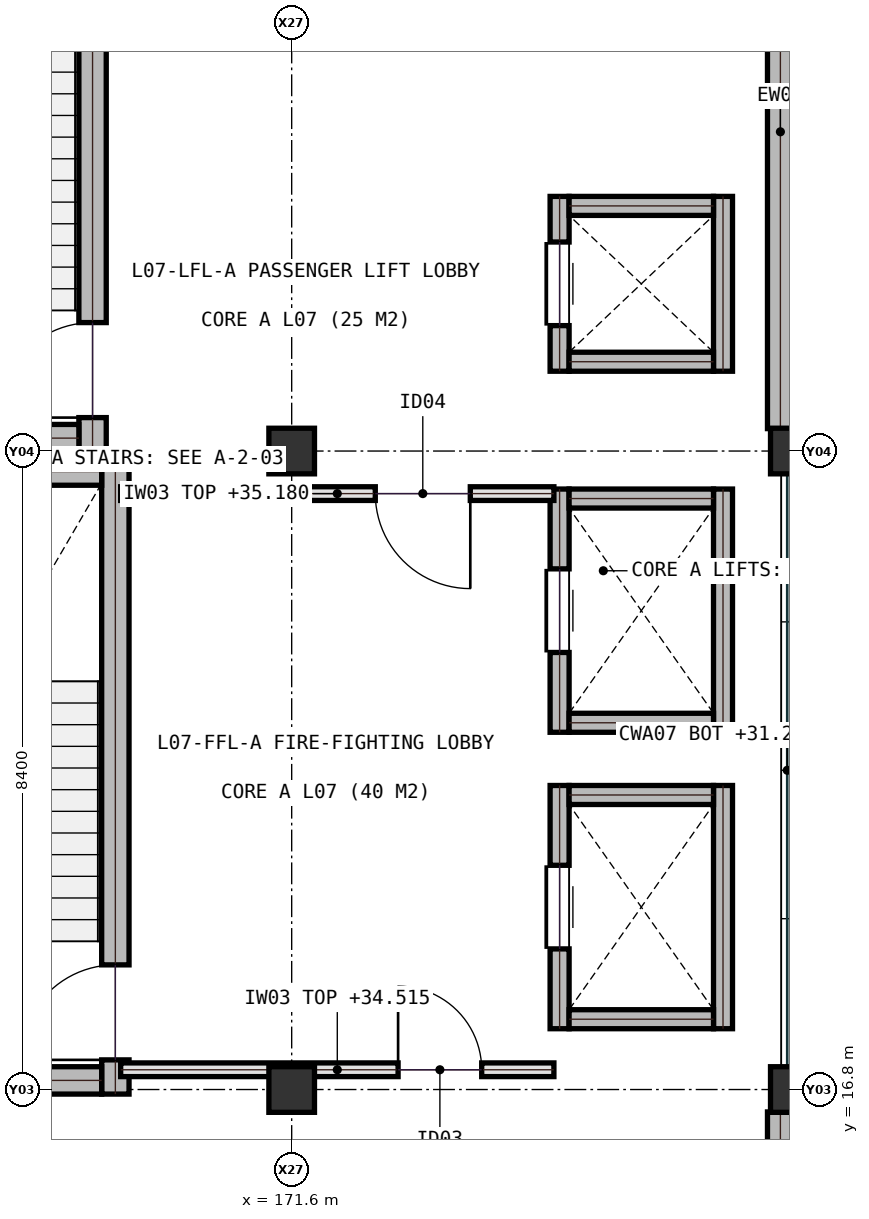
"""IFC4 building model, lengths in metres.
Left out: names, types, materials, properties, quantities, classifications, styles, units other than length and angle.
Written with IfcOpenShell. Run it as: python <this file> out.ifc"""

import sys

from ifc_helpers import new_model, si_unit, direction, frame, frame_2d, origin, origin_2d, place, context, subcontext, project, spatial, rectangle, extrude, element, fill, save


model = new_model("IFC4")
c1 = context("Model", 3, precision=1e-05, world=origin(), true_north=direction((0.0, 1.0)))
c2 = subcontext(c1, "Body", "Model", "MODEL_VIEW")
j1 = project(units=[si_unit("LENGTHUNIT", "METRE"), si_unit("PLANEANGLEUNIT", "RADIAN")], contexts=[c1])
p1 = place(None, origin())
s1 = spatial("IfcSite", under=j1, at=p1, CompositionType="ELEMENT")
p2 = place(p1, origin())
s2 = spatial("IfcBuilding", under=s1, at=p2, CompositionType="ELEMENT")
p3 = place(p2, frame((0.0, 0.0, 31.2)))
s3 = spatial("IfcBuildingStorey", under=s2, at=p3, CompositionType="ELEMENT", Elevation=31.2)
for number, where, z_axis, x_axis in (
    (1, (171.6, 16.8, 0.0), (0.0, 0.0, 1.0), (1.0, 0.0, 0.0)),
    (2, (171.6, 25.2, 0.0), (0.0, 0.0, 1.0), (1.0, 0.0, 0.0)),
    (3, (178.2, 16.8, 0.0), (0.0, 0.0, 1.0), (1.0, 0.0, 0.0)),
    (4, (178.2, 25.2, 0.0), (0.0, 0.0, 1.0), (1.0, 0.0, 0.0)),
):
    element("IfcColumn", number, at=place(p3, frame(where, z_axis=z_axis, x_axis=x_axis)), inside=s3, PredefinedType="COLUMN", context=c2, shape_type="SweptSolid", body=[
        extrude(rectangle(XDim=0.6, YDim=0.6, at=origin_2d()), origin(), (0.0, 0.0, 1.0), 4.2),
    ])
for number, where, z_axis, x_axis in (
    (5, (178.03, 8.695, 0.0), (0.0, 0.0, 1.0), (0.0, 1.0, 0.0)),
    (6, (178.03, 25.495, 0.0), (0.0, 0.0, 1.0), (0.0, 1.0, 0.0)),
):
    element("IfcWall", number, at=place(p3, frame(where, z_axis=z_axis, x_axis=x_axis)), inside=s3, PredefinedType="SHEAR", context=c2, shape_type="SweptSolid", body=[
        extrude(rectangle(XDim=7.81, YDim=0.34, at=frame_2d((3.905, 0.0))), origin(), (0.0, 0.0, 1.0), 3.98),
    ])
p4 = place(p3, frame((169.28, 16.74, 0.0), z_axis=(0.0, 0.0, 1.0), x_axis=(0.0, 1.0, 0.0)))
e7 = element("IfcWall", 7, at=p4, inside=s3, PredefinedType="SHEAR", context=c2, shape_type="SweptSolid", body=[
    extrude(rectangle(XDim=8.37, YDim=0.36, at=frame_2d((4.185, 0.0))), origin(), (0.0, 0.0, 1.0), 3.98),
])
p5 = place(p4, frame((0.45, 0.0, 0.0)))
e8 = element("IfcOpeningElement", 8, at=p5, cuts=e7, PredefinedType="OPENING", context=c2, shape_type="SweptSolid", body=[
    extrude(rectangle(XDim=1.25, YDim=2.15, at=frame_2d((0.625, 1.075))), frame((0.0, 0.19, 0.0), z_axis=(0.0, -1.0, 0.0), x_axis=(1.0, 0.0, 0.0)), (0.0, 0.0, 1.0), 0.38),
])
for number, where, z_axis, x_axis in (
    (9, (165.6, 24.93, 0.0), (0.0, 0.0, 1.0), (1.0, 0.0, 0.0)),
    (10, (165.6, 16.92, 0.0), (0.0, 0.0, 1.0), (1.0, 0.0, 0.0)),
):
    element("IfcWall", number, at=place(p3, frame(where, z_axis=z_axis, x_axis=x_axis)), inside=s3, PredefinedType="SHEAR", context=c2, shape_type="SweptSolid", body=[
        extrude(rectangle(XDim=3.5, YDim=0.36, at=frame_2d((1.75, 0.0))), origin(), (0.0, 0.0, 1.0), 3.98),
    ])
p6 = place(p3, frame((168.98, 25.19, 0.0), z_axis=(0.0, 0.0, 1.0), x_axis=(0.0, 1.0, 0.0)))
e11 = element("IfcWall", 11, at=p6, inside=s3, PredefinedType="SHEAR", context=c2, shape_type="SweptSolid", body=[
    extrude(rectangle(XDim=8.17, YDim=0.36, at=frame_2d((4.085, 0.0))), origin(), (0.0, 0.0, 1.0), 3.98),
])
p7 = place(p6, frame((0.45, 0.0, 0.0)))
e12 = element("IfcOpeningElement", 12, at=p7, cuts=e11, PredefinedType="OPENING", context=c2, shape_type="SweptSolid", body=[
    extrude(rectangle(XDim=1.25, YDim=2.15, at=frame_2d((0.625, 1.075))), frame((0.0, 0.19, 0.0), z_axis=(0.0, -1.0, 0.0), x_axis=(1.0, 0.0, 0.0)), (0.0, 0.0, 1.0), 0.38),
])
p8 = place(p3, frame((165.6, 25.37, 0.0), z_axis=(0.0, 0.0, 1.0), x_axis=(1.0, 0.0, 0.0)))
e13 = element("IfcWall", 13, at=p8, inside=s3, PredefinedType="SHEAR", context=c2, shape_type="SweptSolid", body=[
    extrude(rectangle(XDim=3.2, YDim=0.36, at=frame_2d((1.6, 0.0))), origin(), (0.0, 0.0, 1.0), 3.98),
])
p9 = place(p3, frame((175.125, 17.6, 0.0), z_axis=(0.0, 0.0, 1.0), x_axis=(0.0, 1.0, 0.0)))
e14 = element("IfcWall", 14, at=p9, inside=s3, PredefinedType="SHEAR", context=c2, shape_type="SweptSolid", body=[
    extrude(rectangle(XDim=3.2, YDim=0.25, at=frame_2d((1.6, 0.0))), origin(), (0.0, 0.0, 1.0), 3.98),
])
p10 = place(p9, frame((1.05, 0.0, 0.0)))
e15 = element("IfcOpeningElement", 15, at=p10, cuts=e14, PredefinedType="OPENING", context=c2, shape_type="SweptSolid", body=[
    extrude(rectangle(XDim=1.1, YDim=2.15, at=frame_2d((0.55, 1.075))), frame((0.0, 0.135, 0.0), z_axis=(0.0, -1.0, 0.0), x_axis=(1.0, 0.0, 0.0)), (0.0, 0.0, 1.0), 0.27),
])
p11 = place(p3, frame((177.275, 17.6, 0.0), z_axis=(0.0, 0.0, 1.0), x_axis=(0.0, 1.0, 0.0)))
e16 = element("IfcWall", 16, at=p11, inside=s3, PredefinedType="SHEAR", context=c2, shape_type="SweptSolid", body=[
    extrude(rectangle(XDim=3.2, YDim=0.25, at=frame_2d((1.6, 0.0))), origin(), (0.0, 0.0, 1.0), 3.98),
])
for number, where, z_axis, x_axis in (
    (17, (175.25, 17.725, 0.0), (0.0, 0.0, 1.0), (1.0, 0.0, 0.0)),
    (18, (175.25, 20.675, 0.0), (0.0, 0.0, 1.0), (1.0, 0.0, 0.0)),
):
    element("IfcWall", number, at=place(p3, frame(where, z_axis=z_axis, x_axis=x_axis)), inside=s3, PredefinedType="SHEAR", context=c2, shape_type="SweptSolid", body=[
        extrude(rectangle(XDim=1.9, YDim=0.25, at=frame_2d((0.95, 0.0))), origin(), (0.0, 0.0, 1.0), 3.98),
    ])
p12 = place(p3, frame((175.125, 21.5, 0.0), z_axis=(0.0, 0.0, 1.0), x_axis=(0.0, 1.0, 0.0)))
e19 = element("IfcWall", 19, at=p12, inside=s3, PredefinedType="SHEAR", context=c2, shape_type="SweptSolid", body=[
    extrude(rectangle(XDim=3.2, YDim=0.25, at=frame_2d((1.6, 0.0))), origin(), (0.0, 0.0, 1.0), 3.98),
])
p13 = place(p12, frame((1.05, 0.0, 0.0)))
e20 = element("IfcOpeningElement", 20, at=p13, cuts=e19, PredefinedType="OPENING", context=c2, shape_type="SweptSolid", body=[
    extrude(rectangle(XDim=1.1, YDim=2.15, at=frame_2d((0.55, 1.075))), frame((0.0, 0.135, 0.0), z_axis=(0.0, -1.0, 0.0), x_axis=(1.0, 0.0, 0.0)), (0.0, 0.0, 1.0), 0.27),
])
p14 = place(p3, frame((177.275, 21.5, 0.0), z_axis=(0.0, 0.0, 1.0), x_axis=(0.0, 1.0, 0.0)))
e21 = element("IfcWall", 21, at=p14, inside=s3, PredefinedType="SHEAR", context=c2, shape_type="SweptSolid", body=[
    extrude(rectangle(XDim=3.2, YDim=0.25, at=frame_2d((1.6, 0.0))), origin(), (0.0, 0.0, 1.0), 3.98),
])
for number, where, z_axis, x_axis in (
    (22, (175.25, 21.625, 0.0), (0.0, 0.0, 1.0), (1.0, 0.0, 0.0)),
    (23, (175.25, 24.575, 0.0), (0.0, 0.0, 1.0), (1.0, 0.0, 0.0)),
):
    element("IfcWall", number, at=place(p3, frame(where, z_axis=z_axis, x_axis=x_axis)), inside=s3, PredefinedType="SHEAR", context=c2, shape_type="SweptSolid", body=[
        extrude(rectangle(XDim=1.9, YDim=0.25, at=frame_2d((0.95, 0.0))), origin(), (0.0, 0.0, 1.0), 3.98),
    ])
p15 = place(p3, frame((175.125, 26.25, 0.0), z_axis=(0.0, 0.0, 1.0), x_axis=(0.0, 1.0, 0.0)))
e24 = element("IfcWall", 24, at=p15, inside=s3, PredefinedType="SHEAR", context=c2, shape_type="SweptSolid", body=[
    extrude(rectangle(XDim=2.3, YDim=0.25, at=frame_2d((1.15, 0.0))), origin(), (0.0, 0.0, 1.0), 3.98),
])
p16 = place(p15, frame((0.6, 0.0, 0.0)))
e25 = element("IfcOpeningElement", 25, at=p16, cuts=e24, PredefinedType="OPENING", context=c2, shape_type="SweptSolid", body=[
    extrude(rectangle(XDim=1.1, YDim=2.15, at=frame_2d((0.55, 1.075))), frame((0.0, 0.135, 0.0), z_axis=(0.0, -1.0, 0.0), x_axis=(1.0, 0.0, 0.0)), (0.0, 0.0, 1.0), 0.27),
])
p17 = place(p3, frame((177.275, 26.25, 0.0), z_axis=(0.0, 0.0, 1.0), x_axis=(0.0, 1.0, 0.0)))
e26 = element("IfcWall", 26, at=p17, inside=s3, PredefinedType="SHEAR", context=c2, shape_type="SweptSolid", body=[
    extrude(rectangle(XDim=2.3, YDim=0.25, at=frame_2d((1.15, 0.0))), origin(), (0.0, 0.0, 1.0), 3.98),
])
for number, where, z_axis, x_axis in (
    (27, (175.25, 26.375, 0.0), (0.0, 0.0, 1.0), (1.0, 0.0, 0.0)),
    (28, (175.25, 28.425, 0.0), (0.0, 0.0, 1.0), (1.0, 0.0, 0.0)),
):
    element("IfcWall", number, at=place(p3, frame(where, z_axis=z_axis, x_axis=x_axis)), inside=s3, PredefinedType="SHEAR", context=c2, shape_type="SweptSolid", body=[
        extrude(rectangle(XDim=1.9, YDim=0.25, at=frame_2d((0.95, 0.0))), origin(), (0.0, 0.0, 1.0), 3.98),
    ])
p18 = place(p3, frame((169.35, 24.64, 0.0), z_axis=(0.0, 0.0, 1.0), x_axis=(1.0, 0.0, 0.0)))
e29 = element("IfcWall", 29, at=p18, inside=s3, PredefinedType="SOLIDWALL", context=c2, shape_type="SweptSolid", body=[
    extrude(rectangle(XDim=5.7, YDim=0.18, at=frame_2d((2.85, 0.0))), origin(), (0.0, 0.0, 1.0), 3.98),
])
p19 = place(p18, frame((3.35, 0.0, 0.0)))
e30 = element("IfcOpeningElement", 30, at=p19, cuts=e29, PredefinedType="OPENING", context=c2, shape_type="SweptSolid", body=[
    extrude(rectangle(XDim=1.25, YDim=2.15, at=frame_2d((0.625, 1.075))), frame((0.0, 0.1, 0.0), z_axis=(0.0, -1.0, 0.0), x_axis=(1.0, 0.0, 0.0)), (0.0, 0.0, 1.0), 0.2),
])
p20 = place(p3, frame((169.35, 17.06, 0.0), z_axis=(0.0, 0.0, 1.0), x_axis=(1.0, 0.0, 0.0)))
e31 = element("IfcWall", 31, at=p20, inside=s3, PredefinedType="SOLIDWALL", context=c2, shape_type="SweptSolid", body=[
    extrude(rectangle(XDim=5.7, YDim=0.18, at=frame_2d((2.85, 0.0))), origin(), (0.0, 0.0, 1.0), 3.315),
])
p21 = place(p20, frame((3.65, 0.0, 0.0)))
e32 = element("IfcOpeningElement", 32, at=p21, cuts=e31, PredefinedType="OPENING", context=c2, shape_type="SweptSolid", body=[
    extrude(rectangle(XDim=1.1, YDim=2.15, at=frame_2d((0.55, 1.075))), frame((0.0, 0.1, 0.0), z_axis=(0.0, -1.0, 0.0), x_axis=(1.0, 0.0, 0.0)), (0.0, 0.0, 1.0), 0.2),
])
p22 = place(p5, origin())
e33 = element("IfcDoor", 33, at=p22, inside=s3, OperationType="SINGLE_SWING_LEFT", PredefinedType="DOOR", context=c2, shape_type="SweptSolid", body=[
    extrude(rectangle(XDim=1.25, YDim=2.15, at=frame_2d((0.625, 1.075))), frame((0.0, 0.025, 0.0), z_axis=(0.0, -1.0, 0.0), x_axis=(1.0, 0.0, 0.0)), (0.0, 0.0, 1.0), 0.05),
])
fill(e8, e33)
p23 = place(p7, origin())
e34 = element("IfcDoor", 34, at=p23, inside=s3, OperationType="SINGLE_SWING_LEFT", PredefinedType="DOOR", context=c2, shape_type="SweptSolid", body=[
    extrude(rectangle(XDim=1.25, YDim=2.15, at=frame_2d((0.625, 1.075))), frame((0.0, 0.025, 0.0), z_axis=(0.0, -1.0, 0.0), x_axis=(1.0, 0.0, 0.0)), (0.0, 0.0, 1.0), 0.05),
])
fill(e12, e34)
p24 = place(p10, origin())
e35 = element("IfcDoor", 35, at=p24, inside=s3, OperationType="SLIDING_TO_LEFT", PredefinedType="DOOR", context=c2, shape_type="SweptSolid", body=[
    extrude(rectangle(XDim=1.1, YDim=2.15, at=frame_2d((0.55, 1.075))), frame((0.0, 0.025, 0.0), z_axis=(0.0, -1.0, 0.0), x_axis=(1.0, 0.0, 0.0)), (0.0, 0.0, 1.0), 0.05),
])
fill(e15, e35)
p25 = place(p13, origin())
e36 = element("IfcDoor", 36, at=p25, inside=s3, OperationType="SLIDING_TO_LEFT", PredefinedType="DOOR", context=c2, shape_type="SweptSolid", body=[
    extrude(rectangle(XDim=1.1, YDim=2.15, at=frame_2d((0.55, 1.075))), frame((0.0, 0.025, 0.0), z_axis=(0.0, -1.0, 0.0), x_axis=(1.0, 0.0, 0.0)), (0.0, 0.0, 1.0), 0.05),
])
fill(e20, e36)
p26 = place(p16, origin())
e37 = element("IfcDoor", 37, at=p26, inside=s3, OperationType="SLIDING_TO_LEFT", PredefinedType="DOOR", context=c2, shape_type="SweptSolid", body=[
    extrude(rectangle(XDim=1.1, YDim=2.15, at=frame_2d((0.55, 1.075))), frame((0.0, 0.025, 0.0), z_axis=(0.0, -1.0, 0.0), x_axis=(1.0, 0.0, 0.0)), (0.0, 0.0, 1.0), 0.05),
])
fill(e25, e37)
p27 = place(p19, frame((1.25, 0.0, 0.0), z_axis=(0.0, 0.0, 1.0), x_axis=(-1.0, 0.0, 0.0)))
e38 = element("IfcDoor", 38, at=p27, inside=s3, OperationType="SINGLE_SWING_RIGHT", PredefinedType="DOOR", context=c2, shape_type="SweptSolid", body=[
    extrude(rectangle(XDim=1.25, YDim=2.15, at=frame_2d((0.625, 1.075))), frame((0.0, 0.025, 0.0), z_axis=(0.0, -1.0, 0.0), x_axis=(1.0, 0.0, 0.0)), (0.0, 0.0, 1.0), 0.05),
])
fill(e30, e38)
p28 = place(p21, origin())
e39 = element("IfcDoor", 39, at=p28, inside=s3, OperationType="SINGLE_SWING_LEFT", PredefinedType="DOOR", context=c2, shape_type="SweptSolid", body=[
    extrude(rectangle(XDim=1.1, YDim=2.15, at=frame_2d((0.55, 1.075))), frame((0.0, 0.025, 0.0), z_axis=(0.0, -1.0, 0.0), x_axis=(1.0, 0.0, 0.0)), (0.0, 0.0, 1.0), 0.05),
])
fill(e32, e39)
save(model, sys.argv[1])
